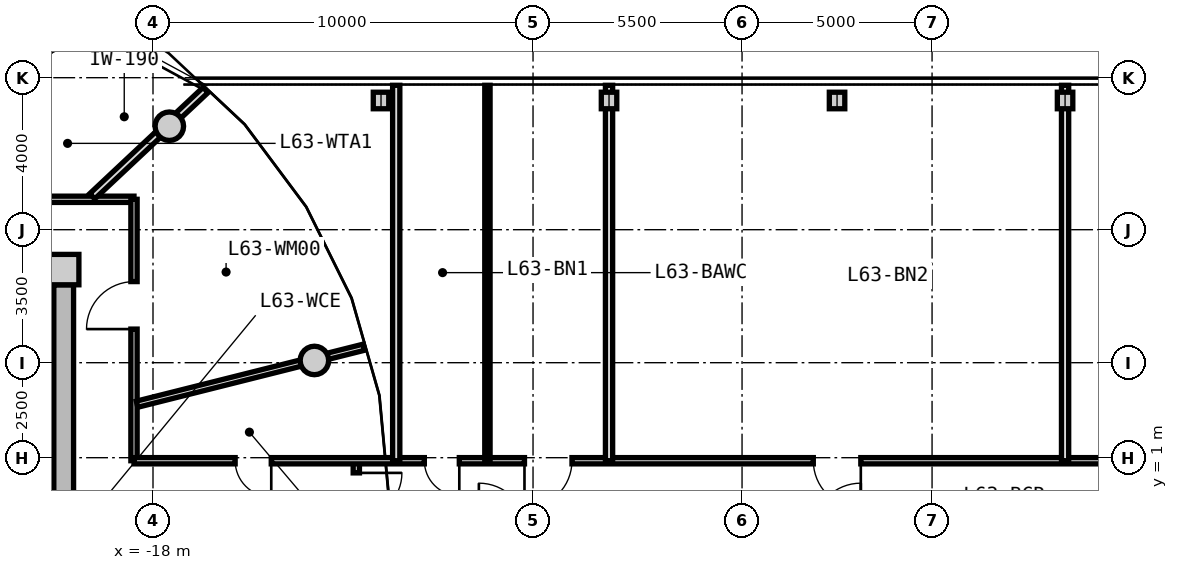
"""IFC4 building model, lengths in metres.
Left out: names, types, materials, properties, quantities, classifications, styles, units other than length and angle.
Written with IfcOpenShell. Run it as: python <this file> out.ifc"""

import sys

from ifc_helpers import new_model, si_unit, direction, frame, frame_2d, origin, origin_2d, place, context, subcontext, project, spatial, rectangle, circle, i_section, extrude, source, transform, mapped, element, fill, save


model = new_model("IFC4")
c1 = context("Model", 3, precision=1e-05, world=origin(), true_north=direction((0.0, 1.0)))
c2 = subcontext(c1, "Body", "Model", "MODEL_VIEW")
j1 = project(units=[si_unit("LENGTHUNIT", "METRE"), si_unit("PLANEANGLEUNIT", "RADIAN")], contexts=[c1])
p1 = place(None, origin())
s1 = spatial("IfcSite", under=j1, at=p1, CompositionType="ELEMENT")
p2 = place(p1, origin())
s2 = spatial("IfcBuilding", under=s1, at=p2, CompositionType="ELEMENT")
p3 = place(p2, frame((0.0, 0.0, 203.8)))
s3 = spatial("IfcBuildingStorey", under=s2, at=p3, CompositionType="ELEMENT", Elevation=203.8)
m1 = source(origin(), c2, "Body", "SweptSolid", [
    extrude(rectangle(XDim=0.8, YDim=0.8, at=origin_2d()), origin(), (0.0, 0.0, 1.0), 4.0),
])
p4 = place(p3, frame((-20.35, 5.95, 0.0), z_axis=(0.0, 0.0, 1.0), x_axis=(1.0, 0.0, 0.0)))
e1 = element("IfcColumn", 1, at=p4, inside=s3, PredefinedType="COLUMN", context=c2, shape_type="MappedRepresentation", body=[
    mapped(m1, transform((0.0, 0.0, 0.0), x_axis=(1.0, 0.0, 0.0), y_axis=(0.0, 1.0, 0.0), z_axis=(0.0, 0.0, 1.0), scale=1.0)),
])
m2 = source(origin(), c2, "Body", "SweptSolid", [
    extrude(rectangle(XDim=11.1, YDim=0.52, at=frame_2d((5.55, 0.0))), origin(), (0.0, 0.0, 1.0), 3.71),
])
p5 = place(p3, frame((-20.35, 5.55, 0.0), z_axis=(0.0, 0.0, 1.0), x_axis=(0.0, -1.0, 0.0)))
e2 = element("IfcWall", 2, at=p5, inside=s3, PredefinedType="SHEAR", context=c2, shape_type="MappedRepresentation", body=[
    mapped(m2, transform((0.0, 0.0, 0.0), x_axis=(1.0, 0.0, 0.0), y_axis=(0.0, 1.0, 0.0), z_axis=(0.0, 0.0, 1.0), scale=1.0)),
])
p6 = place(p5, frame((5.65, 0.0, 0.0)))
e3 = element("IfcOpeningElement", 3, at=p6, cuts=e2, PredefinedType="OPENING", context=c2, shape_type="SweptSolid", body=[
    extrude(rectangle(XDim=1.2, YDim=2.15, at=frame_2d((0.6, 1.075))), frame((0.0, 0.27, 0.0), z_axis=(0.0, -1.0, 0.0), x_axis=(1.0, 0.0, 0.0)), (0.0, 0.0, 1.0), 0.54),
])
m3 = source(origin(), c2, "Body", "SweptSolid", [
    extrude(circle(Radius=0.375, at=origin_2d()), origin(), (0.0, 0.0, 1.0), 4.0),
])
for number, where, z_axis, x_axis in (
    (4, (-13.753, 3.559, 0.0), (0.0, 0.0, 1.0), (1.0, 0.0, 0.0)),
    (5, (-17.57, 9.723, 0.0), (0.0, 0.0, 1.0), (1.0, 0.0, 0.0)),
):
    element("IfcColumn", number, at=place(p3, frame(where, z_axis=z_axis, x_axis=x_axis)), inside=s3, PredefinedType="COLUMN", context=c2, shape_type="MappedRepresentation", body=[
        mapped(m3, transform((0.0, 0.0, 0.0), x_axis=(1.0, 0.0, 0.0), y_axis=(0.0, 1.0, 0.0), z_axis=(0.0, 0.0, 1.0), scale=1.0)),
    ])
m4 = source(origin(), c2, "Body", "SweptSolid", [
    extrude(i_section(OverallWidth=0.407, OverallDepth=0.435, WebThickness=0.024, FlangeThickness=0.039, FilletRadius=0.015, at=origin_2d()), origin(), (0.0, 0.0, 1.0), 4.0),
])
for number, where, z_axis, x_axis in (
    (6, (-12.0, 10.4, 0.0), (0.0, 0.0, 1.0), (1.0, 0.0, 0.0)),
    (7, (-6.0, 10.4, 0.0), (0.0, 0.0, 1.0), (1.0, 0.0, 0.0)),
    (8, (0.0, 10.4, 0.0), (0.0, 0.0, 1.0), (1.0, 0.0, 0.0)),
    (9, (6.0, 10.4, 0.0), (0.0, 0.0, 1.0), (1.0, 0.0, 0.0)),
):
    element("IfcColumn", number, at=place(p3, frame(where, z_axis=z_axis, x_axis=x_axis)), inside=s3, PredefinedType="COLUMN", context=c2, shape_type="MappedRepresentation", body=[
        mapped(m4, transform((0.0, 0.0, 0.0), x_axis=(1.0, 0.0, 0.0), y_axis=(0.0, 1.0, 0.0), z_axis=(0.0, 0.0, 1.0), scale=1.0)),
    ])
m5 = source(origin(), c2, "Body", "SweptSolid", [
    extrude(rectangle(XDim=8.58, YDim=0.165, at=frame_2d((4.29, 0.0))), origin(), (0.0, 0.0, 1.0), 3.695),
])
p7 = place(p3, frame((-27.08, 7.8, 0.0), z_axis=(0.0, 0.0, 1.0), x_axis=(1.0, 0.0, 0.0)))
e10 = element("IfcWall", 10, at=p7, inside=s3, PredefinedType="PARTITIONING", context=c2, shape_type="MappedRepresentation", body=[
    mapped(m5, transform((0.0, 0.0, 0.0), x_axis=(1.0, 0.0, 0.0), y_axis=(0.0, 1.0, 0.0), z_axis=(0.0, 0.0, 1.0), scale=1.0)),
])
p8 = place(p7, frame((5.166, 0.0, 0.0)))
e11 = element("IfcOpeningElement", 11, at=p8, cuts=e10, PredefinedType="OPENING", context=c2, shape_type="SweptSolid", body=[
    extrude(rectangle(XDim=1.05, YDim=2.15, at=frame_2d((0.525, 1.075))), frame((0.0, 0.093, 0.0), z_axis=(0.0, -1.0, 0.0), x_axis=(1.0, 0.0, 0.0)), (0.0, 0.0, 1.0), 0.185),
])
p9 = place(p7, frame((2.076, 0.0, 0.0)))
e12 = element("IfcOpeningElement", 12, at=p9, cuts=e10, PredefinedType="OPENING", context=c2, shape_type="SweptSolid", body=[
    extrude(rectangle(XDim=1.05, YDim=2.15, at=frame_2d((0.525, 1.075))), frame((0.0, 0.093, 0.0), z_axis=(0.0, -1.0, 0.0), x_axis=(1.0, 0.0, 0.0)), (0.0, 0.0, 1.0), 0.185),
])
m6 = source(origin(), c2, "Body", "SweptSolid", [
    extrude(rectangle(XDim=6.88, YDim=0.165, at=frame_2d((3.44, 0.0))), origin(), (0.0, 0.0, 1.0), 3.695),
])
p10 = place(p3, frame((-18.5, 7.8, 0.0), z_axis=(0.0, 0.0, 1.0), x_axis=(0.0, -1.0, 0.0)))
e13 = element("IfcWall", 13, at=p10, inside=s3, PredefinedType="PARTITIONING", context=c2, shape_type="MappedRepresentation", body=[
    mapped(m6, transform((0.0, 0.0, 0.0), x_axis=(1.0, 0.0, 0.0), y_axis=(0.0, 1.0, 0.0), z_axis=(0.0, 0.0, 1.0), scale=1.0)),
])
p11 = place(p10, frame((2.166, 0.0, 0.0)))
e14 = element("IfcOpeningElement", 14, at=p11, cuts=e13, PredefinedType="OPENING", context=c2, shape_type="SweptSolid", body=[
    extrude(rectangle(XDim=1.25, YDim=2.2, at=frame_2d((0.625, 1.1))), frame((0.0, 0.093, 0.0), z_axis=(0.0, -1.0, 0.0), x_axis=(1.0, 0.0, 0.0)), (0.0, 0.0, 1.0), 0.185),
])
m7 = source(origin(), c2, "Body", "SweptSolid", [
    extrude(rectangle(XDim=6.157, YDim=0.165, at=frame_2d((3.079, 0.0))), origin(), (0.0, 0.0, 1.0), 3.295),
])
p12 = place(p3, frame((-18.42, 2.407, 0.0), z_axis=(0.0, 0.0, 1.0), x_axis=(0.969840867184, 0.243738984038, 0.0)))
e15 = element("IfcWall", 15, at=p12, inside=s3, PredefinedType="PARTITIONING", context=c2, shape_type="MappedRepresentation", body=[
    mapped(m7, transform((0.0, 0.0, 0.0), x_axis=(1.0, 0.0, 0.0), y_axis=(0.0, 1.0, 0.0), z_axis=(0.0, 0.0, 1.0), scale=1.0)),
])
m8 = source(origin(), c2, "Body", "SweptSolid", [
    extrude(rectangle(XDim=4.089, YDim=0.19, at=frame_2d((2.044, 0.0))), origin(), (0.0, 0.0, 1.0), 3.295),
])
p13 = place(p3, frame((-19.598, 7.88, 0.0), z_axis=(0.0, 0.0, 1.0), x_axis=(0.729401273609, 0.684086092577, 0.0)))
e16 = element("IfcWall", 16, at=p13, inside=s3, PredefinedType="PARTITIONING", context=c2, shape_type="MappedRepresentation", body=[
    mapped(m8, transform((0.0, 0.0, 0.0), x_axis=(1.0, 0.0, 0.0), y_axis=(0.0, 1.0, 0.0), z_axis=(0.0, 0.0, 1.0), scale=1.0)),
])
m9 = source(origin(), c2, "Body", "SweptSolid", [
    extrude(rectangle(XDim=5.652, YDim=0.19, at=frame_2d((2.826, 0.0))), origin(), (0.0, 0.0, 1.0), 3.695),
])
p14 = place(p3, frame((-23.206, 7.83, 0.0), z_axis=(0.0, 0.0, 1.0), x_axis=(0.527566076956, 0.84951399897, 0.0)))
e17 = element("IfcWall", 17, at=p14, inside=s3, PredefinedType="PARTITIONING", context=c2, shape_type="MappedRepresentation", body=[
    mapped(m9, transform((0.0, 0.0, 0.0), x_axis=(1.0, 0.0, 0.0), y_axis=(0.0, 1.0, 0.0), z_axis=(0.0, 0.0, 1.0), scale=1.0)),
])
m10 = source(origin(), c2, "Body", "SweptSolid", [
    extrude(rectangle(XDim=1.84, YDim=0.165, at=frame_2d((0.92, 0.0))), origin(), (0.0, 0.0, 1.0), 3.695),
])
p15 = place(p3, frame((-12.65, -0.92, 0.0), z_axis=(0.0, 0.0, 1.0), x_axis=(0.0, 1.0, 0.0)))
e18 = element("IfcWall", 18, at=p15, inside=s3, PredefinedType="PARTITIONING", context=c2, shape_type="MappedRepresentation", body=[
    mapped(m10, transform((0.0, 0.0, 0.0), x_axis=(1.0, 0.0, 0.0), y_axis=(0.0, 1.0, 0.0), z_axis=(0.0, 0.0, 1.0), scale=1.0)),
])
p16 = place(p15, frame((0.32, 0.0, 0.0)))
e19 = element("IfcOpeningElement", 19, at=p16, cuts=e18, PredefinedType="OPENING", context=c2, shape_type="SweptSolid", body=[
    extrude(rectangle(XDim=1.2, YDim=2.15, at=frame_2d((0.6, 1.075))), frame((0.0, 0.093, 0.0), z_axis=(0.0, -1.0, 0.0), x_axis=(1.0, 0.0, 0.0)), (0.0, 0.0, 1.0), 0.185),
])
m11 = source(origin(), c2, "Body", "SweptSolid", [
    extrude(rectangle(XDim=37.0, YDim=0.165, at=frame_2d((18.5, 0.0))), origin(), (0.0, 0.0, 1.0), 3.695),
])
p17 = place(p3, frame((-18.5, 0.92, 0.0), z_axis=(0.0, 0.0, 1.0), x_axis=(1.0, 0.0, 0.0)))
e20 = element("IfcWall", 20, at=p17, inside=s3, PredefinedType="PARTITIONING", context=c2, shape_type="MappedRepresentation", body=[
    mapped(m11, transform((0.0, 0.0, 0.0), x_axis=(1.0, 0.0, 0.0), y_axis=(0.0, 1.0, 0.0), z_axis=(0.0, 0.0, 1.0), scale=1.0)),
])
p18 = place(p17, frame((2.662, 0.0, 0.0)))
e21 = element("IfcOpeningElement", 21, at=p18, cuts=e20, PredefinedType="OPENING", context=c2, shape_type="SweptSolid", body=[
    extrude(rectangle(XDim=0.95, YDim=2.1, at=frame_2d((0.475, 1.05))), frame((0.0, 0.093, 0.0), z_axis=(0.0, -1.0, 0.0), x_axis=(1.0, 0.0, 0.0)), (0.0, 0.0, 1.0), 0.185),
])
p19 = place(p17, frame((33.388, 0.0, 0.0)))
e22 = element("IfcOpeningElement", 22, at=p19, cuts=e20, PredefinedType="OPENING", context=c2, shape_type="SweptSolid", body=[
    extrude(rectangle(XDim=0.95, YDim=2.1, at=frame_2d((0.475, 1.05))), frame((0.0, 0.093, 0.0), z_axis=(0.0, -1.0, 0.0), x_axis=(1.0, 0.0, 0.0)), (0.0, 0.0, 1.0), 0.185),
])
p20 = place(p17, frame((7.64, 0.0, 0.0)))
e23 = element("IfcOpeningElement", 23, at=p20, cuts=e20, PredefinedType="OPENING", context=c2, shape_type="SweptSolid", body=[
    extrude(rectangle(XDim=0.92, YDim=2.1, at=frame_2d((0.46, 1.05))), frame((0.0, 0.093, 0.0), z_axis=(0.0, -1.0, 0.0), x_axis=(1.0, 0.0, 0.0)), (0.0, 0.0, 1.0), 0.185),
])
p21 = place(p17, frame((10.275, 0.0, 0.0)))
e24 = element("IfcOpeningElement", 24, at=p21, cuts=e20, PredefinedType="OPENING", context=c2, shape_type="SweptSolid", body=[
    extrude(rectangle(XDim=1.25, YDim=2.2, at=frame_2d((0.625, 1.1))), frame((0.0, 0.093, 0.0), z_axis=(0.0, -1.0, 0.0), x_axis=(1.0, 0.0, 0.0)), (0.0, 0.0, 1.0), 0.185),
])
p22 = place(p17, frame((17.875, 0.0, 0.0)))
e25 = element("IfcOpeningElement", 25, at=p22, cuts=e20, PredefinedType="OPENING", context=c2, shape_type="SweptSolid", body=[
    extrude(rectangle(XDim=1.25, YDim=2.2, at=frame_2d((0.625, 1.1))), frame((0.0, 0.093, 0.0), z_axis=(0.0, -1.0, 0.0), x_axis=(1.0, 0.0, 0.0)), (0.0, 0.0, 1.0), 0.185),
])
p23 = place(p17, frame((26.675, 0.0, 0.0)))
e26 = element("IfcOpeningElement", 26, at=p23, cuts=e20, PredefinedType="OPENING", context=c2, shape_type="SweptSolid", body=[
    extrude(rectangle(XDim=1.25, YDim=2.2, at=frame_2d((0.625, 1.1))), frame((0.0, 0.093, 0.0), z_axis=(0.0, -1.0, 0.0), x_axis=(1.0, 0.0, 0.0)), (0.0, 0.0, 1.0), 0.185),
])
m12 = source(origin(), c2, "Body", "SweptSolid", [
    extrude(rectangle(XDim=9.88, YDim=0.19, at=frame_2d((4.94, 0.0))), origin(), (0.0, 0.0, 1.0), 3.695),
])
p24 = place(p3, frame((-11.6, 0.92, 0.0), z_axis=(0.0, 0.0, 1.0), x_axis=(0.0, 1.0, 0.0)))
e27 = element("IfcWall", 27, at=p24, inside=s3, PredefinedType="PARTITIONING", context=c2, shape_type="MappedRepresentation", body=[
    mapped(m12, transform((0.0, 0.0, 0.0), x_axis=(1.0, 0.0, 0.0), y_axis=(0.0, 1.0, 0.0), z_axis=(0.0, 0.0, 1.0), scale=1.0)),
])
m13 = source(origin(), c2, "Body", "SweptSolid", [
    extrude(rectangle(XDim=9.88, YDim=0.19, at=frame_2d((4.94, 0.0))), origin(), (0.0, 0.0, 1.0), 2.995),
])
p25 = place(p3, frame((-6.0, 0.92, 0.0), z_axis=(0.0, 0.0, 1.0), x_axis=(0.0, 1.0, 0.0)))
e28 = element("IfcWall", 28, at=p25, inside=s3, PredefinedType="PARTITIONING", context=c2, shape_type="MappedRepresentation", body=[
    mapped(m13, transform((0.0, 0.0, 0.0), x_axis=(1.0, 0.0, 0.0), y_axis=(0.0, 1.0, 0.0), z_axis=(0.0, 0.0, 1.0), scale=1.0)),
])
m14 = source(origin(), c2, "Body", "SweptSolid", [
    extrude(rectangle(XDim=9.88, YDim=0.14, at=frame_2d((4.94, 0.0))), origin(), (0.0, 0.0, 1.0), 3.695),
])
p26 = place(p3, frame((-9.2, 0.92, 0.0), z_axis=(0.0, 0.0, 1.0), x_axis=(0.0, 1.0, 0.0)))
e29 = element("IfcWall", 29, at=p26, inside=s3, PredefinedType="PARTITIONING", context=c2, shape_type="MappedRepresentation", body=[
    mapped(m14, transform((0.0, 0.0, 0.0), x_axis=(1.0, 0.0, 0.0), y_axis=(0.0, 1.0, 0.0), z_axis=(0.0, 0.0, 1.0), scale=1.0)),
])
p27 = place(p3, frame((6.0, 0.92, 0.0), z_axis=(0.0, 0.0, 1.0), x_axis=(0.0, 1.0, 0.0)))
e30 = element("IfcWall", 30, at=p27, inside=s3, PredefinedType="PARTITIONING", context=c2, shape_type="MappedRepresentation", body=[
    mapped(m13, transform((0.0, 0.0, 0.0), x_axis=(1.0, 0.0, 0.0), y_axis=(0.0, 1.0, 0.0), z_axis=(0.0, 0.0, 1.0), scale=1.0)),
])
m15 = source(origin(), c2, "Body", "SweptSolid", [
    extrude(rectangle(XDim=0.95, YDim=2.1, at=frame_2d((0.475, 1.05))), frame((0.0, 0.025, 0.0), z_axis=(0.0, -1.0, 0.0), x_axis=(1.0, 0.0, 0.0)), (0.0, 0.0, 1.0), 0.05),
])
p28 = place(p18, frame((0.95, 0.0, 0.0), z_axis=(0.0, 0.0, 1.0), x_axis=(-1.0, 0.0, 0.0)))
e31 = element("IfcDoor", 31, at=p28, inside=s3, OperationType="SINGLE_SWING_LEFT", PredefinedType="DOOR", context=c2, shape_type="MappedRepresentation", body=[
    mapped(m15, transform((0.0, 0.0, 0.0), x_axis=(1.0, 0.0, 0.0), y_axis=(0.0, 1.0, 0.0), z_axis=(0.0, 0.0, 1.0), scale=1.0)),
])
fill(e21, e31)
m16 = source(origin(), c2, "Body", "SweptSolid", [
    extrude(rectangle(XDim=1.25, YDim=2.2, at=frame_2d((0.625, 1.1))), frame((0.0, 0.025, 0.0), z_axis=(0.0, -1.0, 0.0), x_axis=(1.0, 0.0, 0.0)), (0.0, 0.0, 1.0), 0.05),
])
p29 = place(p11, frame((1.25, 0.0, 0.0), z_axis=(0.0, 0.0, 1.0), x_axis=(-1.0, 0.0, 0.0)))
e32 = element("IfcDoor", 32, at=p29, inside=s3, OperationType="SINGLE_SWING_LEFT", PredefinedType="DOOR", context=c2, shape_type="MappedRepresentation", body=[
    mapped(m16, transform((0.0, 0.0, 0.0), x_axis=(1.0, 0.0, 0.0), y_axis=(0.0, 1.0, 0.0), z_axis=(0.0, 0.0, 1.0), scale=1.0)),
])
fill(e14, e32)
m17 = source(origin(), c2, "Body", "SweptSolid", [
    extrude(rectangle(XDim=1.2, YDim=2.15, at=frame_2d((0.6, 1.075))), frame((0.0, 0.025, 0.0), z_axis=(0.0, -1.0, 0.0), x_axis=(1.0, 0.0, 0.0)), (0.0, 0.0, 1.0), 0.05),
])
p30 = place(p16, frame((1.2, 0.0, 0.0), z_axis=(0.0, 0.0, 1.0), x_axis=(-1.0, 0.0, 0.0)))
e33 = element("IfcDoor", 33, at=p30, inside=s3, OperationType="SINGLE_SWING_LEFT", PredefinedType="DOOR", context=c2, shape_type="MappedRepresentation", body=[
    mapped(m17, transform((0.0, 0.0, 0.0), x_axis=(1.0, 0.0, 0.0), y_axis=(0.0, 1.0, 0.0), z_axis=(0.0, 0.0, 1.0), scale=1.0)),
])
fill(e19, e33)
m18 = source(origin(), c2, "Body", "SweptSolid", [
    extrude(rectangle(XDim=0.92, YDim=2.1, at=frame_2d((0.46, 1.05))), frame((0.0, 0.025, 0.0), z_axis=(0.0, -1.0, 0.0), x_axis=(1.0, 0.0, 0.0)), (0.0, 0.0, 1.0), 0.05),
])
p31 = place(p20, frame((0.92, 0.0, 0.0), z_axis=(0.0, 0.0, 1.0), x_axis=(-1.0, 0.0, 0.0)))
e34 = element("IfcDoor", 34, at=p31, inside=s3, OperationType="SINGLE_SWING_LEFT", PredefinedType="DOOR", context=c2, shape_type="MappedRepresentation", body=[
    mapped(m18, transform((0.0, 0.0, 0.0), x_axis=(1.0, 0.0, 0.0), y_axis=(0.0, 1.0, 0.0), z_axis=(0.0, 0.0, 1.0), scale=1.0)),
])
fill(e23, e34)
p32 = place(p21, frame((1.25, 0.0, 0.0), z_axis=(0.0, 0.0, 1.0), x_axis=(-1.0, 0.0, 0.0)))
e35 = element("IfcDoor", 35, at=p32, inside=s3, OperationType="SINGLE_SWING_RIGHT", PredefinedType="DOOR", context=c2, shape_type="MappedRepresentation", body=[
    mapped(m16, transform((0.0, 0.0, 0.0), x_axis=(1.0, 0.0, 0.0), y_axis=(0.0, 1.0, 0.0), z_axis=(0.0, 0.0, 1.0), scale=1.0)),
])
fill(e24, e35)
p33 = place(p22, frame((1.25, 0.0, 0.0), z_axis=(0.0, 0.0, 1.0), x_axis=(-1.0, 0.0, 0.0)))
e36 = element("IfcDoor", 36, at=p33, inside=s3, OperationType="SINGLE_SWING_LEFT", PredefinedType="DOOR", context=c2, shape_type="MappedRepresentation", body=[
    mapped(m16, transform((0.0, 0.0, 0.0), x_axis=(1.0, 0.0, 0.0), y_axis=(0.0, 1.0, 0.0), z_axis=(0.0, 0.0, 1.0), scale=1.0)),
])
fill(e25, e36)
save(model, sys.argv[1])
